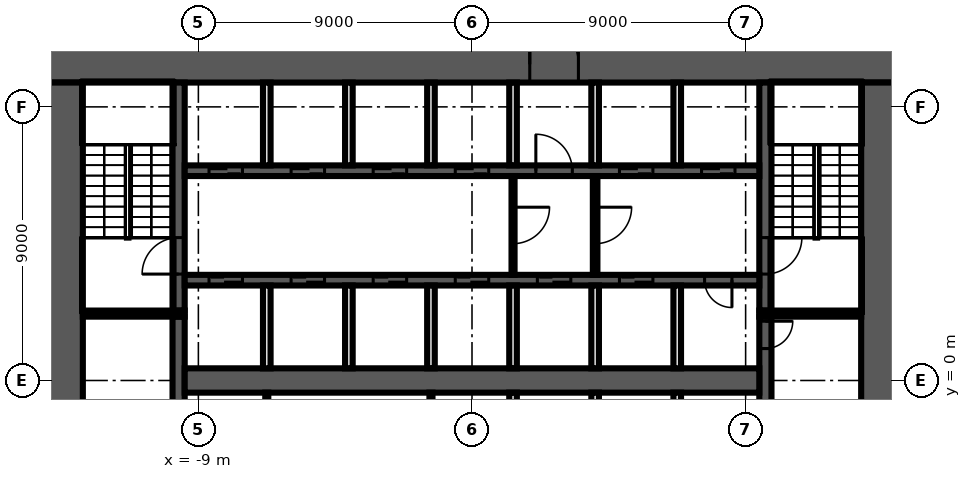
"""IFC4 building model, lengths in metres.
Left out: names, types, materials, properties, quantities, classifications, styles, units other than length and angle.
Written with IfcOpenShell. Run it as: python <this file> out.ifc"""

import sys

from ifc_helpers import new_model, si_unit, direction, frame, frame_2d, origin, place, context, subcontext, project, spatial, rectangle, extrude, element, fill, save


model = new_model("IFC4")
c1 = context("Model", 3, precision=1e-05, world=origin(), true_north=direction((0.0, 1.0)))
c2 = subcontext(c1, "Body", "Model", "MODEL_VIEW")
j1 = project(units=[si_unit("LENGTHUNIT", "METRE"), si_unit("PLANEANGLEUNIT", "RADIAN")], contexts=[c1])
p1 = place(None, origin())
s1 = spatial("IfcSite", under=j1, at=p1, CompositionType="ELEMENT")
p2 = place(p1, origin())
s2 = spatial("IfcBuilding", under=s1, at=p2, CompositionType="ELEMENT")
p3 = place(p2, frame((0.0, 0.0, 9.0)))
s3 = spatial("IfcBuildingStorey", under=s2, at=p3, CompositionType="ELEMENT", Elevation=9.0)
p4 = place(p3, frame((-14.0, 10.4, 0.0), z_axis=(0.0, 0.0, 1.0), x_axis=(1.0, 0.0, 0.0)))
e1 = element("IfcWall", 1, at=p4, inside=s3, PredefinedType="SHEAR", context=c2, shape_type="SweptSolid", body=[
    extrude(rectangle(XDim=28.0, YDim=1.2, at=frame_2d((14.0, 0.0))), origin(), (0.0, 0.0, 1.0), 9.55),
])
p5 = place(p4, frame((15.9, 0.0, 0.0)))
e2 = element("IfcOpeningElement", 2, at=p5, cuts=e1, PredefinedType="OPENING", context=c2, shape_type="SweptSolid", body=[
    extrude(rectangle(XDim=1.6, YDim=2.1, at=frame_2d((0.8, 1.05))), frame((0.0, 0.61, 0.0), z_axis=(0.0, -1.0, 0.0), x_axis=(1.0, 0.0, 0.0)), (0.0, 0.0, 1.0), 1.22),
])
for number, where, z_axis, x_axis in (
    (3, (13.4, 9.8, 0.0), (0.0, 0.0, 1.0), (0.0, -1.0, 0.0)),
    (4, (-13.4, -9.8, 0.0), (0.0, 0.0, 1.0), (0.0, 1.0, 0.0)),
):
    element("IfcWall", number, at=place(p3, frame(where, z_axis=z_axis, x_axis=x_axis)), inside=s3, PredefinedType="SHEAR", context=c2, shape_type="SweptSolid", body=[
        extrude(rectangle(XDim=19.6, YDim=1.2, at=frame_2d((9.8, 0.0))), origin(), (0.0, 0.0, 1.0), 9.55),
    ])
p6 = place(p3, frame((9.65, 2.1, 0.0), z_axis=(0.0, 0.0, 1.0), x_axis=(0.0, -1.0, 0.0)))
e5 = element("IfcWall", 5, at=p6, inside=s3, PredefinedType="SHEAR", context=c2, shape_type="SweptSolid", body=[
    extrude(rectangle(XDim=4.2, YDim=0.4, at=frame_2d((2.1, 0.0))), origin(), (0.0, 0.0, 1.0), 9.55),
])
p7 = place(p6, frame((0.15, 0.0, 0.0)))
e6 = element("IfcOpeningElement", 6, at=p7, cuts=e5, PredefinedType="OPENING", context=c2, shape_type="SweptSolid", body=[
    extrude(rectangle(XDim=0.9, YDim=2.1, at=frame_2d((0.45, 1.05))), frame((0.0, 0.21, 0.0), z_axis=(0.0, -1.0, 0.0), x_axis=(1.0, 0.0, 0.0)), (0.0, 0.0, 1.0), 0.42),
])
p8 = place(p3, frame((9.65, 9.8, 0.0), z_axis=(0.0, 0.0, 1.0), x_axis=(0.0, -1.0, 0.0)))
e7 = element("IfcWall", 7, at=p8, inside=s3, PredefinedType="SHEAR", context=c2, shape_type="SweptSolid", body=[
    extrude(rectangle(XDim=7.5, YDim=0.4, at=frame_2d((3.75, 0.0))), origin(), (0.0, 0.0, 1.0), 9.55),
])
p9 = place(p8, frame((5.1, 0.0, 0.0)))
e8 = element("IfcOpeningElement", 8, at=p9, cuts=e7, PredefinedType="OPENING", context=c2, shape_type="SweptSolid", body=[
    extrude(rectangle(XDim=1.2, YDim=2.1, at=frame_2d((0.6, 1.05))), frame((0.0, 0.21, 0.0), z_axis=(0.0, -1.0, 0.0), x_axis=(1.0, 0.0, 0.0)), (0.0, 0.0, 1.0), 0.42),
])
p10 = place(p3, frame((-9.65, -2.1, 0.0), z_axis=(0.0, 0.0, 1.0), x_axis=(0.0, 1.0, 0.0)))
e9 = element("IfcWall", 9, at=p10, inside=s3, PredefinedType="SHEAR", context=c2, shape_type="SweptSolid", body=[
    extrude(rectangle(XDim=4.2, YDim=0.4, at=frame_2d((2.1, 0.0))), origin(), (0.0, 0.0, 1.0), 9.55),
])
p11 = place(p3, frame((-9.65, 2.3, 0.0), z_axis=(0.0, 0.0, 1.0), x_axis=(0.0, 1.0, 0.0)))
e10 = element("IfcWall", 10, at=p11, inside=s3, PredefinedType="SHEAR", context=c2, shape_type="SweptSolid", body=[
    extrude(rectangle(XDim=7.5, YDim=0.4, at=frame_2d((3.75, 0.0))), origin(), (0.0, 0.0, 1.0), 9.55),
])
p12 = place(p11, frame((1.2, 0.0, 0.0)))
e11 = element("IfcOpeningElement", 11, at=p12, cuts=e10, PredefinedType="OPENING", context=c2, shape_type="SweptSolid", body=[
    extrude(rectangle(XDim=1.2, YDim=2.1, at=frame_2d((0.6, 1.05))), frame((0.0, 0.21, 0.0), z_axis=(0.0, -1.0, 0.0), x_axis=(1.0, 0.0, 0.0)), (0.0, 0.0, 1.0), 0.42),
])
for number, where, z_axis, x_axis in (
    (12, (9.45, 2.2, 0.0), (0.0, 0.0, 1.0), (1.0, 0.0, 0.0)),
    (13, (-9.45, 2.2, 0.0), (0.0, 0.0, 1.0), (-1.0, 0.0, 0.0)),
):
    element("IfcWall", number, at=place(p3, frame(where, z_axis=z_axis, x_axis=x_axis)), inside=s3, PredefinedType="SHEAR", context=c2, shape_type="SweptSolid", body=[
        extrude(rectangle(XDim=3.35, YDim=0.2, at=frame_2d((1.675, 0.0))), origin(), (0.0, 0.0, 1.0), 9.55),
    ])
p13 = place(p3, frame((-9.45, 6.9, 0.0), z_axis=(0.0, 0.0, 1.0), x_axis=(1.0, 0.0, 0.0)))
e14 = element("IfcWall", 14, at=p13, inside=s3, PredefinedType="SHEAR", context=c2, shape_type="SweptSolid", body=[
    extrude(rectangle(XDim=18.9, YDim=0.35, at=frame_2d((9.45, 0.0))), origin(), (0.0, 0.0, 1.0), 9.55),
])
p14 = place(p13, frame((0.8, 0.0, 0.0)))
e15 = element("IfcOpeningElement", 15, at=p14, cuts=e14, PredefinedType="OPENING", context=c2, shape_type="SweptSolid", body=[
    extrude(rectangle(XDim=1.1, YDim=2.1, at=frame_2d((0.55, 1.05))), frame((0.0, 0.185, 0.0), z_axis=(0.0, -1.0, 0.0), x_axis=(1.0, 0.0, 0.0)), (0.0, 0.0, 1.0), 0.37),
])
p15 = place(p13, frame((3.5, 0.0, 0.0)))
e16 = element("IfcOpeningElement", 16, at=p15, cuts=e14, PredefinedType="OPENING", context=c2, shape_type="SweptSolid", body=[
    extrude(rectangle(XDim=1.1, YDim=2.1, at=frame_2d((0.55, 1.05))), frame((0.0, 0.185, 0.0), z_axis=(0.0, -1.0, 0.0), x_axis=(1.0, 0.0, 0.0)), (0.0, 0.0, 1.0), 0.37),
])
p16 = place(p13, frame((6.2, 0.0, 0.0)))
e17 = element("IfcOpeningElement", 17, at=p16, cuts=e14, PredefinedType="OPENING", context=c2, shape_type="SweptSolid", body=[
    extrude(rectangle(XDim=1.1, YDim=2.1, at=frame_2d((0.55, 1.05))), frame((0.0, 0.185, 0.0), z_axis=(0.0, -1.0, 0.0), x_axis=(1.0, 0.0, 0.0)), (0.0, 0.0, 1.0), 0.37),
])
p17 = place(p13, frame((8.9, 0.0, 0.0)))
e18 = element("IfcOpeningElement", 18, at=p17, cuts=e14, PredefinedType="OPENING", context=c2, shape_type="SweptSolid", body=[
    extrude(rectangle(XDim=1.1, YDim=2.1, at=frame_2d((0.55, 1.05))), frame((0.0, 0.185, 0.0), z_axis=(0.0, -1.0, 0.0), x_axis=(1.0, 0.0, 0.0)), (0.0, 0.0, 1.0), 0.37),
])
p18 = place(p13, frame((11.55, 0.0, 0.0)))
e19 = element("IfcOpeningElement", 19, at=p18, cuts=e14, PredefinedType="OPENING", context=c2, shape_type="SweptSolid", body=[
    extrude(rectangle(XDim=1.2, YDim=2.1, at=frame_2d((0.6, 1.05))), frame((0.0, 0.185, 0.0), z_axis=(0.0, -1.0, 0.0), x_axis=(1.0, 0.0, 0.0)), (0.0, 0.0, 1.0), 0.37),
])
p19 = place(p13, frame((14.3, 0.0, 0.0)))
e20 = element("IfcOpeningElement", 20, at=p19, cuts=e14, PredefinedType="OPENING", context=c2, shape_type="SweptSolid", body=[
    extrude(rectangle(XDim=1.1, YDim=2.1, at=frame_2d((0.55, 1.05))), frame((0.0, 0.185, 0.0), z_axis=(0.0, -1.0, 0.0), x_axis=(1.0, 0.0, 0.0)), (0.0, 0.0, 1.0), 0.37),
])
p20 = place(p13, frame((17.0, 0.0, 0.0)))
e21 = element("IfcOpeningElement", 21, at=p20, cuts=e14, PredefinedType="OPENING", context=c2, shape_type="SweptSolid", body=[
    extrude(rectangle(XDim=1.1, YDim=2.1, at=frame_2d((0.55, 1.05))), frame((0.0, 0.185, 0.0), z_axis=(0.0, -1.0, 0.0), x_axis=(1.0, 0.0, 0.0)), (0.0, 0.0, 1.0), 0.37),
])
p21 = place(p3, frame((9.45, 3.3, 0.0), z_axis=(0.0, 0.0, 1.0), x_axis=(-1.0, 0.0, 0.0)))
e22 = element("IfcWall", 22, at=p21, inside=s3, PredefinedType="SHEAR", context=c2, shape_type="SweptSolid", body=[
    extrude(rectangle(XDim=18.9, YDim=0.35, at=frame_2d((9.45, 0.0))), origin(), (0.0, 0.0, 1.0), 9.55),
])
p22 = place(p21, frame((17.0, 0.0, 0.0)))
e23 = element("IfcOpeningElement", 23, at=p22, cuts=e22, PredefinedType="OPENING", context=c2, shape_type="SweptSolid", body=[
    extrude(rectangle(XDim=1.1, YDim=2.1, at=frame_2d((0.55, 1.05))), frame((0.0, 0.185, 0.0), z_axis=(0.0, -1.0, 0.0), x_axis=(1.0, 0.0, 0.0)), (0.0, 0.0, 1.0), 0.37),
])
p23 = place(p21, frame((14.3, 0.0, 0.0)))
e24 = element("IfcOpeningElement", 24, at=p23, cuts=e22, PredefinedType="OPENING", context=c2, shape_type="SweptSolid", body=[
    extrude(rectangle(XDim=1.1, YDim=2.1, at=frame_2d((0.55, 1.05))), frame((0.0, 0.185, 0.0), z_axis=(0.0, -1.0, 0.0), x_axis=(1.0, 0.0, 0.0)), (0.0, 0.0, 1.0), 0.37),
])
p24 = place(p21, frame((11.6, 0.0, 0.0)))
e25 = element("IfcOpeningElement", 25, at=p24, cuts=e22, PredefinedType="OPENING", context=c2, shape_type="SweptSolid", body=[
    extrude(rectangle(XDim=1.1, YDim=2.1, at=frame_2d((0.55, 1.05))), frame((0.0, 0.185, 0.0), z_axis=(0.0, -1.0, 0.0), x_axis=(1.0, 0.0, 0.0)), (0.0, 0.0, 1.0), 0.37),
])
p25 = place(p21, frame((8.9, 0.0, 0.0)))
e26 = element("IfcOpeningElement", 26, at=p25, cuts=e22, PredefinedType="OPENING", context=c2, shape_type="SweptSolid", body=[
    extrude(rectangle(XDim=1.1, YDim=2.1, at=frame_2d((0.55, 1.05))), frame((0.0, 0.185, 0.0), z_axis=(0.0, -1.0, 0.0), x_axis=(1.0, 0.0, 0.0)), (0.0, 0.0, 1.0), 0.37),
])
p26 = place(p21, frame((6.2, 0.0, 0.0)))
e27 = element("IfcOpeningElement", 27, at=p26, cuts=e22, PredefinedType="OPENING", context=c2, shape_type="SweptSolid", body=[
    extrude(rectangle(XDim=1.1, YDim=2.1, at=frame_2d((0.55, 1.05))), frame((0.0, 0.185, 0.0), z_axis=(0.0, -1.0, 0.0), x_axis=(1.0, 0.0, 0.0)), (0.0, 0.0, 1.0), 0.37),
])
p27 = place(p21, frame((3.5, 0.0, 0.0)))
e28 = element("IfcOpeningElement", 28, at=p27, cuts=e22, PredefinedType="OPENING", context=c2, shape_type="SweptSolid", body=[
    extrude(rectangle(XDim=1.1, YDim=2.1, at=frame_2d((0.55, 1.05))), frame((0.0, 0.185, 0.0), z_axis=(0.0, -1.0, 0.0), x_axis=(1.0, 0.0, 0.0)), (0.0, 0.0, 1.0), 0.37),
])
p28 = place(p21, frame((0.9, 0.0, 0.0)))
e29 = element("IfcOpeningElement", 29, at=p28, cuts=e22, PredefinedType="OPENING", context=c2, shape_type="SweptSolid", body=[
    extrude(rectangle(XDim=0.9, YDim=2.1, at=frame_2d((0.45, 1.05))), frame((0.0, 0.185, 0.0), z_axis=(0.0, -1.0, 0.0), x_axis=(1.0, 0.0, 0.0)), (0.0, 0.0, 1.0), 0.37),
])
p29 = place(p3, frame((-9.45, 0.0, 0.0), z_axis=(0.0, 0.0, 1.0), x_axis=(1.0, 0.0, 0.0)))
e30 = element("IfcWall", 30, at=p29, inside=s3, PredefinedType="SHEAR", context=c2, shape_type="SweptSolid", body=[
    extrude(rectangle(XDim=18.9, YDim=0.8, at=frame_2d((9.45, 0.0))), origin(), (0.0, 0.0, 1.0), 9.55),
])
for number, where, z_axis, x_axis in (
    (31, (6.75, -3.125, 0.0), (0.0, 0.0, 1.0), (0.0, 1.0, 0.0)),
    (32, (6.75, 0.4, 0.0), (0.0, 0.0, 1.0), (0.0, 1.0, 0.0)),
    (33, (6.75, 7.075, 0.0), (0.0, 0.0, 1.0), (0.0, 1.0, 0.0)),
):
    element("IfcWall", number, at=place(p3, frame(where, z_axis=z_axis, x_axis=x_axis)), inside=s3, PredefinedType="SOLIDWALL", context=c2, shape_type="SweptSolid", body=[
        extrude(rectangle(XDim=2.725, YDim=0.25, at=frame_2d((1.363, 0.0))), origin(), (0.0, 0.0, 1.0), 9.55),
    ])
p30 = place(p3, frame((4.05, 6.725, 0.0), z_axis=(0.0, 0.0, 1.0), x_axis=(0.0, -1.0, 0.0)))
e34 = element("IfcWall", 34, at=p30, inside=s3, PredefinedType="PARTITIONING", context=c2, shape_type="SweptSolid", body=[
    extrude(rectangle(XDim=3.25, YDim=0.15, at=frame_2d((1.625, 0.0))), origin(), (0.0, 0.0, 1.0), 9.55),
])
p31 = place(p30, frame((1.025, 0.0, 0.0)))
e35 = element("IfcOpeningElement", 35, at=p31, cuts=e34, PredefinedType="OPENING", context=c2, shape_type="SweptSolid", body=[
    extrude(rectangle(XDim=1.2, YDim=2.1, at=frame_2d((0.6, 1.05))), frame((0.0, 0.085, 0.0), z_axis=(0.0, -1.0, 0.0), x_axis=(1.0, 0.0, 0.0)), (0.0, 0.0, 1.0), 0.17),
])
for number, where, z_axis, x_axis in (
    (36, (4.05, -3.125, 0.0), (0.0, 0.0, 1.0), (0.0, 1.0, 0.0)),
    (37, (4.05, 0.4, 0.0), (0.0, 0.0, 1.0), (0.0, 1.0, 0.0)),
    (38, (4.05, 7.075, 0.0), (0.0, 0.0, 1.0), (0.0, 1.0, 0.0)),
):
    element("IfcWall", number, at=place(p3, frame(where, z_axis=z_axis, x_axis=x_axis)), inside=s3, PredefinedType="SOLIDWALL", context=c2, shape_type="SweptSolid", body=[
        extrude(rectangle(XDim=2.725, YDim=0.25, at=frame_2d((1.363, 0.0))), origin(), (0.0, 0.0, 1.0), 9.55),
    ])
p32 = place(p3, frame((1.35, 6.725, 0.0), z_axis=(0.0, 0.0, 1.0), x_axis=(0.0, -1.0, 0.0)))
e39 = element("IfcWall", 39, at=p32, inside=s3, PredefinedType="PARTITIONING", context=c2, shape_type="SweptSolid", body=[
    extrude(rectangle(XDim=3.25, YDim=0.1, at=frame_2d((1.625, 0.0))), origin(), (0.0, 0.0, 1.0), 9.55),
])
p33 = place(p32, frame((1.025, 0.0, 0.0)))
e40 = element("IfcOpeningElement", 40, at=p33, cuts=e39, PredefinedType="OPENING", context=c2, shape_type="SweptSolid", body=[
    extrude(rectangle(XDim=1.2, YDim=2.1, at=frame_2d((0.6, 1.05))), frame((0.0, 0.06, 0.0), z_axis=(0.0, -1.0, 0.0), x_axis=(1.0, 0.0, 0.0)), (0.0, 0.0, 1.0), 0.12),
])
for number, where, z_axis, x_axis in (
    (41, (1.35, -3.125, 0.0), (0.0, 0.0, 1.0), (0.0, 1.0, 0.0)),
    (42, (1.35, 0.4, 0.0), (0.0, 0.0, 1.0), (0.0, 1.0, 0.0)),
    (43, (1.35, 7.075, 0.0), (0.0, 0.0, 1.0), (0.0, 1.0, 0.0)),
):
    element("IfcWall", number, at=place(p3, frame(where, z_axis=z_axis, x_axis=x_axis)), inside=s3, PredefinedType="SOLIDWALL", context=c2, shape_type="SweptSolid", body=[
        extrude(rectangle(XDim=2.725, YDim=0.25, at=frame_2d((1.363, 0.0))), origin(), (0.0, 0.0, 1.0), 9.55),
    ])
p34 = place(p3, frame((-1.35, -3.125, 0.0), z_axis=(0.0, 0.0, 1.0), x_axis=(0.0, 1.0, 0.0)))
e44 = element("IfcWall", 44, at=p34, inside=s3, PredefinedType="PARTITIONING", context=c2, shape_type="SweptSolid", body=[
    extrude(rectangle(XDim=2.725, YDim=0.1, at=frame_2d((1.363, 0.0))), origin(), (0.0, 0.0, 1.0), 9.55),
])
for number, where, z_axis, x_axis in (
    (45, (-1.35, 0.4, 0.0), (0.0, 0.0, 1.0), (0.0, 1.0, 0.0)),
    (46, (-1.35, 7.075, 0.0), (0.0, 0.0, 1.0), (0.0, 1.0, 0.0)),
    (47, (-4.05, 0.4, 0.0), (0.0, 0.0, 1.0), (0.0, 1.0, 0.0)),
    (48, (-4.05, 7.075, 0.0), (0.0, 0.0, 1.0), (0.0, 1.0, 0.0)),
):
    element("IfcWall", number, at=place(p3, frame(where, z_axis=z_axis, x_axis=x_axis)), inside=s3, PredefinedType="SOLIDWALL", context=c2, shape_type="SweptSolid", body=[
        extrude(rectangle(XDim=2.725, YDim=0.25, at=frame_2d((1.363, 0.0))), origin(), (0.0, 0.0, 1.0), 9.55),
    ])
p35 = place(p3, frame((-6.75, -3.125, 0.0), z_axis=(0.0, 0.0, 1.0), x_axis=(0.0, 1.0, 0.0)))
e49 = element("IfcWall", 49, at=p35, inside=s3, PredefinedType="PARTITIONING", context=c2, shape_type="SweptSolid", body=[
    extrude(rectangle(XDim=2.725, YDim=0.1, at=frame_2d((1.363, 0.0))), origin(), (0.0, 0.0, 1.0), 9.55),
])
for number, where, z_axis, x_axis in (
    (50, (-6.75, 0.4, 0.0), (0.0, 0.0, 1.0), (0.0, 1.0, 0.0)),
    (51, (-6.75, 7.075, 0.0), (0.0, 0.0, 1.0), (0.0, 1.0, 0.0)),
):
    element("IfcWall", number, at=place(p3, frame(where, z_axis=z_axis, x_axis=x_axis)), inside=s3, PredefinedType="SOLIDWALL", context=c2, shape_type="SweptSolid", body=[
        extrude(rectangle(XDim=2.725, YDim=0.25, at=frame_2d((1.363, 0.0))), origin(), (0.0, 0.0, 1.0), 9.55),
    ])
p36 = place(p7, origin())
e52 = element("IfcDoor", 52, at=p36, inside=s3, OperationType="SINGLE_SWING_RIGHT", PredefinedType="DOOR", context=c2, shape_type="SweptSolid", body=[
    extrude(rectangle(XDim=0.9, YDim=2.1, at=frame_2d((0.45, 1.05))), frame((0.0, 0.025, 0.0), z_axis=(0.0, -1.0, 0.0), x_axis=(1.0, 0.0, 0.0)), (0.0, 0.0, 1.0), 0.05),
])
fill(e6, e52)
p37 = place(p14, origin())
e53 = element("IfcDoor", 53, at=p37, inside=s3, OperationType="DOUBLE_DOOR_SLIDING", PredefinedType="DOOR", context=c2, shape_type="SweptSolid", body=[
    extrude(rectangle(XDim=1.1, YDim=2.1, at=frame_2d((0.55, 1.05))), frame((0.0, 0.025, 0.0), z_axis=(0.0, -1.0, 0.0), x_axis=(1.0, 0.0, 0.0)), (0.0, 0.0, 1.0), 0.05),
])
fill(e15, e53)
p38 = place(p15, origin())
e54 = element("IfcDoor", 54, at=p38, inside=s3, OperationType="DOUBLE_DOOR_SLIDING", PredefinedType="DOOR", context=c2, shape_type="SweptSolid", body=[
    extrude(rectangle(XDim=1.1, YDim=2.1, at=frame_2d((0.55, 1.05))), frame((0.0, 0.025, 0.0), z_axis=(0.0, -1.0, 0.0), x_axis=(1.0, 0.0, 0.0)), (0.0, 0.0, 1.0), 0.05),
])
fill(e16, e54)
p39 = place(p16, origin())
e55 = element("IfcDoor", 55, at=p39, inside=s3, OperationType="DOUBLE_DOOR_SLIDING", PredefinedType="DOOR", context=c2, shape_type="SweptSolid", body=[
    extrude(rectangle(XDim=1.1, YDim=2.1, at=frame_2d((0.55, 1.05))), frame((0.0, 0.025, 0.0), z_axis=(0.0, -1.0, 0.0), x_axis=(1.0, 0.0, 0.0)), (0.0, 0.0, 1.0), 0.05),
])
fill(e17, e55)
p40 = place(p17, origin())
e56 = element("IfcDoor", 56, at=p40, inside=s3, OperationType="DOUBLE_DOOR_SLIDING", PredefinedType="DOOR", context=c2, shape_type="SweptSolid", body=[
    extrude(rectangle(XDim=1.1, YDim=2.1, at=frame_2d((0.55, 1.05))), frame((0.0, 0.025, 0.0), z_axis=(0.0, -1.0, 0.0), x_axis=(1.0, 0.0, 0.0)), (0.0, 0.0, 1.0), 0.05),
])
fill(e18, e56)
p41 = place(p5, origin())
e57 = element("IfcDoor", 57, at=p41, inside=s3, OperationType="DOUBLE_DOOR_SINGLE_SWING", PredefinedType="DOOR", context=c2, shape_type="SweptSolid", body=[
    extrude(rectangle(XDim=1.6, YDim=2.1, at=frame_2d((0.8, 1.05))), frame((0.0, 0.025, 0.0), z_axis=(0.0, -1.0, 0.0), x_axis=(1.0, 0.0, 0.0)), (0.0, 0.0, 1.0), 0.05),
])
fill(e2, e57)
p42 = place(p18, origin())
e58 = element("IfcDoor", 58, at=p42, inside=s3, OperationType="SINGLE_SWING_LEFT", PredefinedType="DOOR", context=c2, shape_type="SweptSolid", body=[
    extrude(rectangle(XDim=1.2, YDim=2.1, at=frame_2d((0.6, 1.05))), frame((0.0, 0.025, 0.0), z_axis=(0.0, -1.0, 0.0), x_axis=(1.0, 0.0, 0.0)), (0.0, 0.0, 1.0), 0.05),
])
fill(e19, e58)
p43 = place(p19, origin())
e59 = element("IfcDoor", 59, at=p43, inside=s3, OperationType="DOUBLE_DOOR_SLIDING", PredefinedType="DOOR", context=c2, shape_type="SweptSolid", body=[
    extrude(rectangle(XDim=1.1, YDim=2.1, at=frame_2d((0.55, 1.05))), frame((0.0, 0.025, 0.0), z_axis=(0.0, -1.0, 0.0), x_axis=(1.0, 0.0, 0.0)), (0.0, 0.0, 1.0), 0.05),
])
fill(e20, e59)
p44 = place(p20, origin())
e60 = element("IfcDoor", 60, at=p44, inside=s3, OperationType="DOUBLE_DOOR_SLIDING", PredefinedType="DOOR", context=c2, shape_type="SweptSolid", body=[
    extrude(rectangle(XDim=1.1, YDim=2.1, at=frame_2d((0.55, 1.05))), frame((0.0, 0.025, 0.0), z_axis=(0.0, -1.0, 0.0), x_axis=(1.0, 0.0, 0.0)), (0.0, 0.0, 1.0), 0.05),
])
fill(e21, e60)
p45 = place(p22, origin())
e61 = element("IfcDoor", 61, at=p45, inside=s3, OperationType="DOUBLE_DOOR_SLIDING", PredefinedType="DOOR", context=c2, shape_type="SweptSolid", body=[
    extrude(rectangle(XDim=1.1, YDim=2.1, at=frame_2d((0.55, 1.05))), frame((0.0, 0.025, 0.0), z_axis=(0.0, -1.0, 0.0), x_axis=(1.0, 0.0, 0.0)), (0.0, 0.0, 1.0), 0.05),
])
fill(e23, e61)
p46 = place(p23, origin())
e62 = element("IfcDoor", 62, at=p46, inside=s3, OperationType="DOUBLE_DOOR_SLIDING", PredefinedType="DOOR", context=c2, shape_type="SweptSolid", body=[
    extrude(rectangle(XDim=1.1, YDim=2.1, at=frame_2d((0.55, 1.05))), frame((0.0, 0.025, 0.0), z_axis=(0.0, -1.0, 0.0), x_axis=(1.0, 0.0, 0.0)), (0.0, 0.0, 1.0), 0.05),
])
fill(e24, e62)
p47 = place(p24, origin())
e63 = element("IfcDoor", 63, at=p47, inside=s3, OperationType="DOUBLE_DOOR_SLIDING", PredefinedType="DOOR", context=c2, shape_type="SweptSolid", body=[
    extrude(rectangle(XDim=1.1, YDim=2.1, at=frame_2d((0.55, 1.05))), frame((0.0, 0.025, 0.0), z_axis=(0.0, -1.0, 0.0), x_axis=(1.0, 0.0, 0.0)), (0.0, 0.0, 1.0), 0.05),
])
fill(e25, e63)
p48 = place(p25, origin())
e64 = element("IfcDoor", 64, at=p48, inside=s3, OperationType="DOUBLE_DOOR_SLIDING", PredefinedType="DOOR", context=c2, shape_type="SweptSolid", body=[
    extrude(rectangle(XDim=1.1, YDim=2.1, at=frame_2d((0.55, 1.05))), frame((0.0, 0.025, 0.0), z_axis=(0.0, -1.0, 0.0), x_axis=(1.0, 0.0, 0.0)), (0.0, 0.0, 1.0), 0.05),
])
fill(e26, e64)
p49 = place(p26, origin())
e65 = element("IfcDoor", 65, at=p49, inside=s3, OperationType="DOUBLE_DOOR_SLIDING", PredefinedType="DOOR", context=c2, shape_type="SweptSolid", body=[
    extrude(rectangle(XDim=1.1, YDim=2.1, at=frame_2d((0.55, 1.05))), frame((0.0, 0.025, 0.0), z_axis=(0.0, -1.0, 0.0), x_axis=(1.0, 0.0, 0.0)), (0.0, 0.0, 1.0), 0.05),
])
fill(e27, e65)
p50 = place(p27, origin())
e66 = element("IfcDoor", 66, at=p50, inside=s3, OperationType="DOUBLE_DOOR_SLIDING", PredefinedType="DOOR", context=c2, shape_type="SweptSolid", body=[
    extrude(rectangle(XDim=1.1, YDim=2.1, at=frame_2d((0.55, 1.05))), frame((0.0, 0.025, 0.0), z_axis=(0.0, -1.0, 0.0), x_axis=(1.0, 0.0, 0.0)), (0.0, 0.0, 1.0), 0.05),
])
fill(e28, e66)
p51 = place(p28, origin())
e67 = element("IfcDoor", 67, at=p51, inside=s3, OperationType="SINGLE_SWING_LEFT", PredefinedType="DOOR", context=c2, shape_type="SweptSolid", body=[
    extrude(rectangle(XDim=0.9, YDim=2.1, at=frame_2d((0.45, 1.05))), frame((0.0, 0.025, 0.0), z_axis=(0.0, -1.0, 0.0), x_axis=(1.0, 0.0, 0.0)), (0.0, 0.0, 1.0), 0.05),
])
fill(e29, e67)
p52 = place(p9, origin())
e68 = element("IfcDoor", 68, at=p52, inside=s3, OperationType="SINGLE_SWING_LEFT", PredefinedType="DOOR", context=c2, shape_type="SweptSolid", body=[
    extrude(rectangle(XDim=1.2, YDim=2.1, at=frame_2d((0.6, 1.05))), frame((0.0, 0.025, 0.0), z_axis=(0.0, -1.0, 0.0), x_axis=(1.0, 0.0, 0.0)), (0.0, 0.0, 1.0), 0.05),
])
fill(e8, e68)
p53 = place(p12, origin())
e69 = element("IfcDoor", 69, at=p53, inside=s3, OperationType="SINGLE_SWING_RIGHT", PredefinedType="DOOR", context=c2, shape_type="SweptSolid", body=[
    extrude(rectangle(XDim=1.2, YDim=2.1, at=frame_2d((0.6, 1.05))), frame((0.0, 0.025, 0.0), z_axis=(0.0, -1.0, 0.0), x_axis=(1.0, 0.0, 0.0)), (0.0, 0.0, 1.0), 0.05),
])
fill(e11, e69)
p54 = place(p33, origin())
e70 = element("IfcDoor", 70, at=p54, inside=s3, OperationType="SINGLE_SWING_LEFT", PredefinedType="DOOR", context=c2, shape_type="SweptSolid", body=[
    extrude(rectangle(XDim=1.2, YDim=2.1, at=frame_2d((0.6, 1.05))), frame((0.0, 0.025, 0.0), z_axis=(0.0, -1.0, 0.0), x_axis=(1.0, 0.0, 0.0)), (0.0, 0.0, 1.0), 0.05),
])
fill(e40, e70)
p55 = place(p31, origin())
e71 = element("IfcDoor", 71, at=p55, inside=s3, OperationType="SINGLE_SWING_RIGHT", PredefinedType="DOOR", context=c2, shape_type="SweptSolid", body=[
    extrude(rectangle(XDim=1.2, YDim=2.1, at=frame_2d((0.6, 1.05))), frame((0.0, 0.025, 0.0), z_axis=(0.0, -1.0, 0.0), x_axis=(1.0, 0.0, 0.0)), (0.0, 0.0, 1.0), 0.05),
])
fill(e35, e71)
save(model, sys.argv[1])
